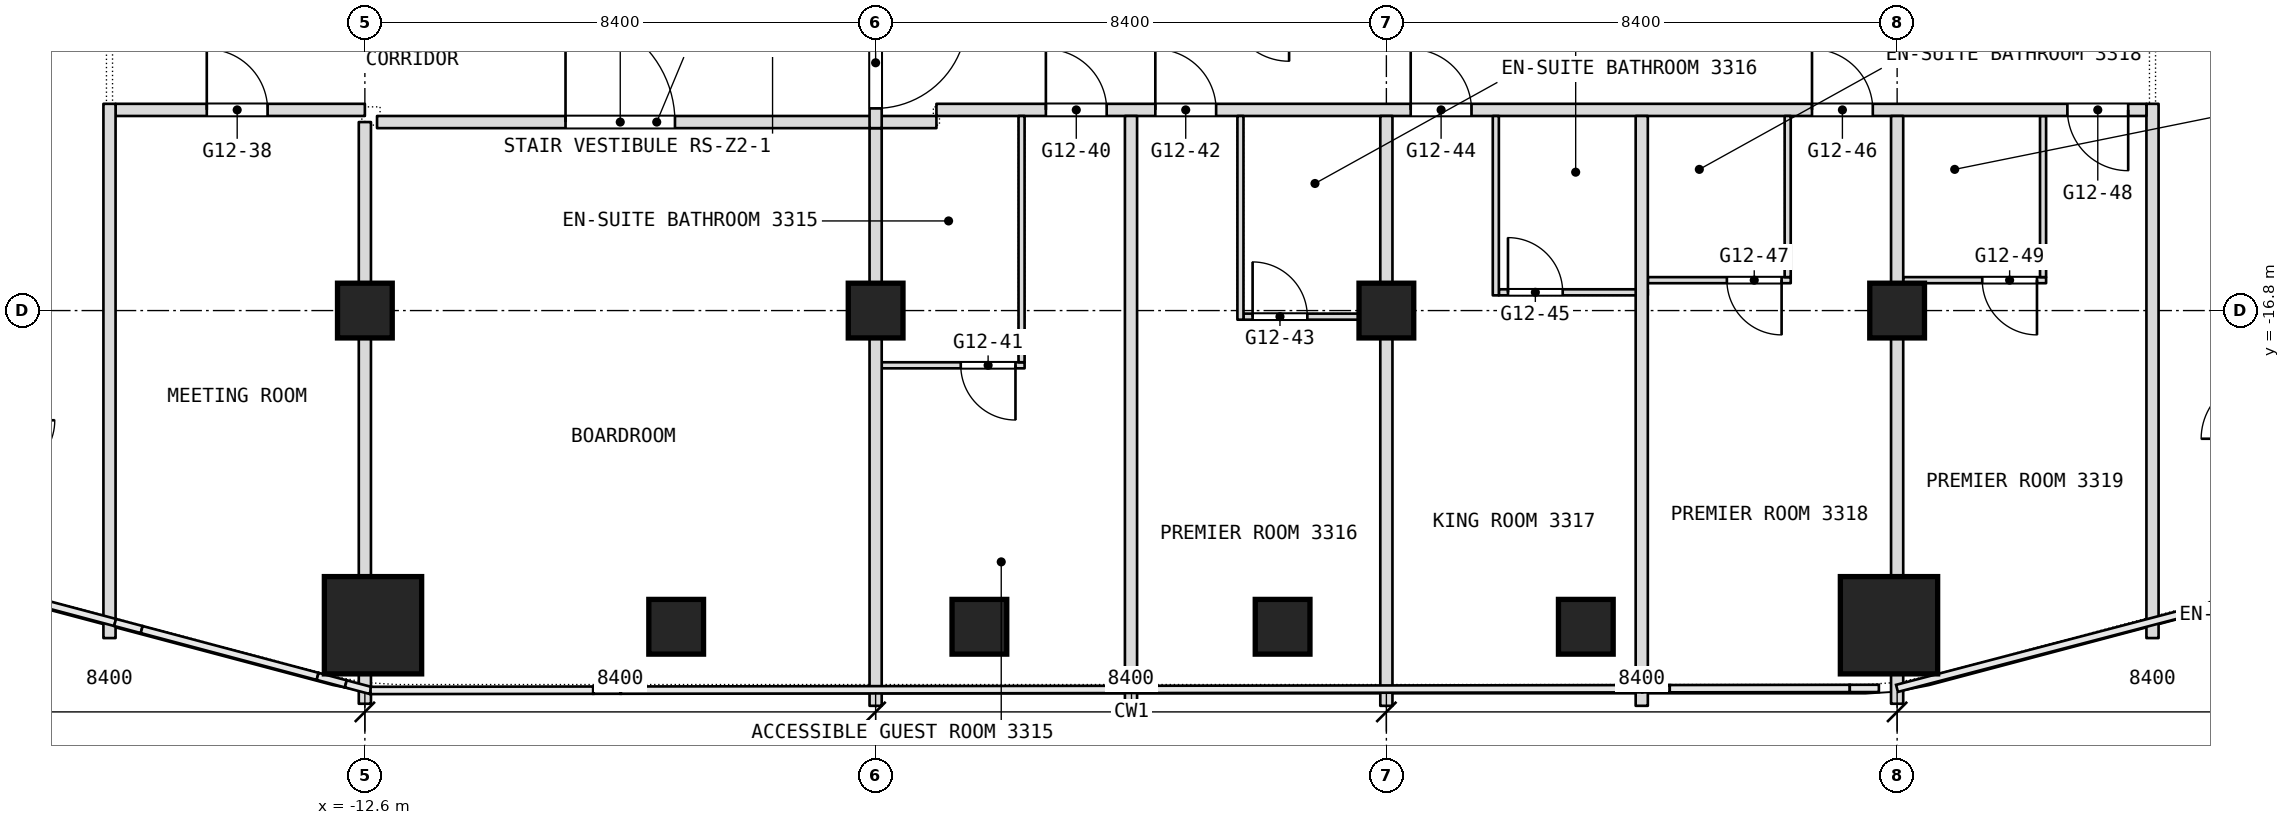
"""IFC4 building model, lengths in metres.
Left out: names, types, materials, properties, quantities, classifications, styles, units other than length and angle.
Written with IfcOpenShell. Run it as: python <this file> out.ifc"""

import sys

from ifc_helpers import new_model, si_unit, direction, frame, frame_2d, origin, origin_2d, place, context, subcontext, project, spatial, rectangle, extrude, element, fill, save


model = new_model("IFC4")
c1 = context("Model", 3, precision=1e-05, world=origin(), true_north=direction((0.0, 1.0)))
c2 = subcontext(c1, "Body", "Model", "MODEL_VIEW")
j1 = project(units=[si_unit("LENGTHUNIT", "METRE"), si_unit("PLANEANGLEUNIT", "RADIAN")], contexts=[c1])
p1 = place(None, origin())
s1 = spatial("IfcSite", under=j1, at=p1, CompositionType="ELEMENT")
p2 = place(p1, origin())
s2 = spatial("IfcBuilding", under=s1, at=p2, CompositionType="ELEMENT")
p3 = place(p2, frame((0.0, 0.0, 144.5)))
s3 = spatial("IfcBuildingStorey", under=s2, at=p3, CompositionType="ELEMENT", Elevation=144.5)
for number, where, z_axis, x_axis in (
    (1, (-12.466, -21.975, 0.0), (0.0, 0.0, 1.0), (1.0, 0.0, 0.0)),
    (2, (12.466, -21.975, 0.0), (0.0, 0.0, 1.0), (1.0, 0.0, 0.0)),
):
    element("IfcColumn", number, at=place(p3, frame(where, z_axis=z_axis, x_axis=x_axis)), inside=s3, PredefinedType="COLUMN", context=c2, shape_type="SweptSolid", body=[
        extrude(rectangle(XDim=1.6, YDim=1.6, at=origin_2d()), origin(), (0.0, 0.0, 1.0), 3.6),
    ])
for number, where, z_axis, x_axis in (
    (3, (-12.6, -16.8, 0.0), (0.0, 0.0, 1.0), (1.0, 0.0, 0.0)),
    (4, (-4.2, -16.8, 0.0), (0.0, 0.0, 1.0), (1.0, 0.0, 0.0)),
    (5, (4.2, -16.8, 0.0), (0.0, 0.0, 1.0), (1.0, 0.0, 0.0)),
    (6, (12.6, -16.8, 0.0), (0.0, 0.0, 1.0), (1.0, 0.0, 0.0)),
    (7, (7.48, -22.0, 0.0), (0.0, 0.0, 1.0), (1.0, 0.0, 0.0)),
    (8, (2.493, -22.0, 0.0), (0.0, 0.0, 1.0), (1.0, 0.0, 0.0)),
    (9, (-2.493, -22.0, 0.0), (0.0, 0.0, 1.0), (1.0, 0.0, 0.0)),
    (10, (-7.48, -22.0, 0.0), (0.0, 0.0, 1.0), (1.0, 0.0, 0.0)),
):
    element("IfcColumn", number, at=place(p3, frame(where, z_axis=z_axis, x_axis=x_axis)), inside=s3, PredefinedType="COLUMN", context=c2, shape_type="SweptSolid", body=[
        extrude(rectangle(XDim=0.9, YDim=0.9, at=origin_2d()), origin(), (0.0, 0.0, 1.0), 3.6),
    ])
p4 = place(p3, frame((-4.1, -17.7, 0.0), z_axis=(0.0, 0.0, 1.0), x_axis=(1.0, 0.0, 0.0)))
e11 = element("IfcWall", 11, at=p4, inside=s3, PredefinedType="PARTITIONING", context=c2, shape_type="SweptSolid", body=[
    extrude(rectangle(XDim=2.35, YDim=0.1, at=frame_2d((1.175, 0.0))), origin(), (0.0, 0.0, 1.0), 3.34),
])
p5 = place(p4, frame((1.3, 0.0, 0.0)))
e12 = element("IfcOpeningElement", 12, at=p5, cuts=e11, PredefinedType="OPENING", context=c2, shape_type="SweptSolid", body=[
    extrude(rectangle(XDim=0.9, YDim=2.1, at=frame_2d((0.45, 1.05))), frame((0.0, 0.05, 0.0), z_axis=(0.0, -1.0, 0.0), x_axis=(1.0, 0.0, 0.0)), (0.0, 0.0, 1.0), 0.1),
])
p6 = place(p3, frame((1.85, -16.9, 0.0), z_axis=(0.0, 0.0, 1.0), x_axis=(1.0, 0.0, 0.0)))
e13 = element("IfcWall", 13, at=p6, inside=s3, PredefinedType="PARTITIONING", context=c2, shape_type="SweptSolid", body=[
    extrude(rectangle(XDim=2.45, YDim=0.1, at=frame_2d((1.225, 0.0))), origin(), (0.0, 0.0, 1.0), 2.89),
])
p7 = place(p6, frame((0.15, 0.0, 0.0)))
e14 = element("IfcOpeningElement", 14, at=p7, cuts=e13, PredefinedType="OPENING", context=c2, shape_type="SweptSolid", body=[
    extrude(rectangle(XDim=0.9, YDim=2.1, at=frame_2d((0.45, 1.05))), frame((0.0, 0.05, 0.0), z_axis=(0.0, -1.0, 0.0), x_axis=(1.0, 0.0, 0.0)), (0.0, 0.0, 1.0), 0.1),
])
p8 = place(p3, frame((16.8, -22.186, 0.0), z_axis=(0.0, 0.0, 1.0), x_axis=(0.0, 1.0, 0.0)))
e15 = element("IfcWall", 15, at=p8, inside=s3, PredefinedType="PARTITIONING", context=c2, shape_type="SweptSolid", body=[
    extrude(rectangle(XDim=8.786, YDim=0.2, at=frame_2d((4.393, 0.0))), origin(), (0.0, 0.0, 1.0), 3.34),
])
p9 = place(p3, frame((6.05, -16.5, 0.0), z_axis=(0.0, 0.0, 1.0), x_axis=(1.0, 0.0, 0.0)))
e16 = element("IfcWall", 16, at=p9, inside=s3, PredefinedType="PARTITIONING", context=c2, shape_type="SweptSolid", body=[
    extrude(rectangle(XDim=2.45, YDim=0.1, at=frame_2d((1.225, 0.0))), origin(), (0.0, 0.0, 1.0), 3.34),
])
p10 = place(p9, frame((0.15, 0.0, 0.0)))
e17 = element("IfcOpeningElement", 17, at=p10, cuts=e16, PredefinedType="OPENING", context=c2, shape_type="SweptSolid", body=[
    extrude(rectangle(XDim=0.9, YDim=2.1, at=frame_2d((0.45, 1.05))), frame((0.0, 0.05, 0.0), z_axis=(0.0, -1.0, 0.0), x_axis=(1.0, 0.0, 0.0)), (0.0, 0.0, 1.0), 0.1),
])
p11 = place(p3, frame((8.5, -16.3, 0.0), z_axis=(0.0, 0.0, 1.0), x_axis=(1.0, 0.0, 0.0)))
e18 = element("IfcWall", 18, at=p11, inside=s3, PredefinedType="PARTITIONING", context=c2, shape_type="SweptSolid", body=[
    extrude(rectangle(XDim=2.35, YDim=0.1, at=frame_2d((1.175, 0.0))), origin(), (0.0, 0.0, 1.0), 3.34),
])
p12 = place(p11, frame((1.3, 0.0, 0.0)))
e19 = element("IfcOpeningElement", 19, at=p12, cuts=e18, PredefinedType="OPENING", context=c2, shape_type="SweptSolid", body=[
    extrude(rectangle(XDim=0.9, YDim=2.1, at=frame_2d((0.45, 1.05))), frame((0.0, 0.05, 0.0), z_axis=(0.0, -1.0, 0.0), x_axis=(1.0, 0.0, 0.0)), (0.0, 0.0, 1.0), 0.1),
])
p13 = place(p3, frame((12.7, -16.3, 0.0), z_axis=(0.0, 0.0, 1.0), x_axis=(1.0, 0.0, 0.0)))
e20 = element("IfcWall", 20, at=p13, inside=s3, PredefinedType="PARTITIONING", context=c2, shape_type="SweptSolid", body=[
    extrude(rectangle(XDim=2.35, YDim=0.1, at=frame_2d((1.175, 0.0))), origin(), (0.0, 0.0, 1.0), 3.34),
])
p14 = place(p13, frame((1.3, 0.0, 0.0)))
e21 = element("IfcOpeningElement", 21, at=p14, cuts=e20, PredefinedType="OPENING", context=c2, shape_type="SweptSolid", body=[
    extrude(rectangle(XDim=0.9, YDim=2.1, at=frame_2d((0.45, 1.05))), frame((0.0, 0.05, 0.0), z_axis=(0.0, -1.0, 0.0), x_axis=(1.0, 0.0, 0.0)), (0.0, 0.0, 1.0), 0.1),
])
p15 = place(p3, frame((15.0, -16.25, 0.0), z_axis=(0.0, 0.0, 1.0), x_axis=(0.0, 1.0, 0.0)))
e22 = element("IfcWall", 22, at=p15, inside=s3, PredefinedType="PARTITIONING", context=c2, shape_type="SweptSolid", body=[
    extrude(rectangle(XDim=2.65, YDim=0.1, at=frame_2d((1.325, 0.0))), origin(), (0.0, 0.0, 1.0), 3.34),
])
p16 = place(p3, frame((-12.4, -13.7, 0.0), z_axis=(0.0, 0.0, 1.0), x_axis=(1.0, 0.0, 0.0)))
e23 = element("IfcWall", 23, at=p16, inside=s3, PredefinedType="PARTITIONING", context=c2, shape_type="SweptSolid", body=[
    extrude(rectangle(XDim=9.2, YDim=0.2, at=frame_2d((4.6, 0.0))), origin(), (0.0, 0.0, 1.0), 3.34),
])
p17 = place(p16, frame((3.1, 0.0, 0.0)))
e24 = element("IfcOpeningElement", 24, at=p17, cuts=e23, PredefinedType="OPENING", context=c2, shape_type="SweptSolid", body=[
    extrude(rectangle(XDim=1.8, YDim=2.1, at=frame_2d((0.9, 1.05))), frame((0.0, 0.1, 0.0), z_axis=(0.0, -1.0, 0.0), x_axis=(1.0, 0.0, 0.0)), (0.0, 0.0, 1.0), 0.2),
])
p18 = place(p3, frame((-16.7, -13.5, 0.0), z_axis=(0.0, 0.0, 1.0), x_axis=(1.0, 0.0, 0.0)))
e25 = element("IfcWall", 25, at=p18, inside=s3, PredefinedType="PARTITIONING", context=c2, shape_type="SweptSolid", body=[
    extrude(rectangle(XDim=4.1, YDim=0.2, at=frame_2d((2.05, 0.0))), origin(), (0.0, 0.0, 1.0), 3.34),
])
p19 = place(p18, frame((1.5, 0.0, 0.0)))
e26 = element("IfcOpeningElement", 26, at=p19, cuts=e25, PredefinedType="OPENING", context=c2, shape_type="SweptSolid", body=[
    extrude(rectangle(XDim=1.0, YDim=2.1, at=frame_2d((0.5, 1.05))), frame((0.0, 0.1, 0.0), z_axis=(0.0, -1.0, 0.0), x_axis=(1.0, 0.0, 0.0)), (0.0, 0.0, 1.0), 0.2),
])
p20 = place(p3, frame((-3.2, -13.5, 0.0), z_axis=(0.0, 0.0, 1.0), x_axis=(1.0, 0.0, 0.0)))
e27 = element("IfcWall", 27, at=p20, inside=s3, PredefinedType="PARTITIONING", context=c2, shape_type="SweptSolid", body=[
    extrude(rectangle(XDim=19.9, YDim=0.2, at=frame_2d((9.95, 0.0))), origin(), (0.0, 0.0, 1.0), 3.34),
])
p21 = place(p20, frame((1.8, 0.0, 0.0)))
e28 = element("IfcOpeningElement", 28, at=p21, cuts=e27, PredefinedType="OPENING", context=c2, shape_type="SweptSolid", body=[
    extrude(rectangle(XDim=1.0, YDim=2.1, at=frame_2d((0.5, 1.05))), frame((0.0, 0.1, 0.0), z_axis=(0.0, -1.0, 0.0), x_axis=(1.0, 0.0, 0.0)), (0.0, 0.0, 1.0), 0.2),
])
p22 = place(p20, frame((3.6, 0.0, 0.0)))
e29 = element("IfcOpeningElement", 29, at=p22, cuts=e27, PredefinedType="OPENING", context=c2, shape_type="SweptSolid", body=[
    extrude(rectangle(XDim=1.0, YDim=2.1, at=frame_2d((0.5, 1.05))), frame((0.0, 0.1, 0.0), z_axis=(0.0, -1.0, 0.0), x_axis=(1.0, 0.0, 0.0)), (0.0, 0.0, 1.0), 0.2),
])
p23 = place(p20, frame((7.8, 0.0, 0.0)))
e30 = element("IfcOpeningElement", 30, at=p23, cuts=e27, PredefinedType="OPENING", context=c2, shape_type="SweptSolid", body=[
    extrude(rectangle(XDim=1.0, YDim=2.1, at=frame_2d((0.5, 1.05))), frame((0.0, 0.1, 0.0), z_axis=(0.0, -1.0, 0.0), x_axis=(1.0, 0.0, 0.0)), (0.0, 0.0, 1.0), 0.2),
])
p24 = place(p20, frame((14.4, 0.0, 0.0)))
e31 = element("IfcOpeningElement", 31, at=p24, cuts=e27, PredefinedType="OPENING", context=c2, shape_type="SweptSolid", body=[
    extrude(rectangle(XDim=1.0, YDim=2.1, at=frame_2d((0.5, 1.05))), frame((0.0, 0.1, 0.0), z_axis=(0.0, -1.0, 0.0), x_axis=(1.0, 0.0, 0.0)), (0.0, 0.0, 1.0), 0.2),
])
p25 = place(p20, frame((18.6, 0.0, 0.0)))
e32 = element("IfcOpeningElement", 32, at=p25, cuts=e27, PredefinedType="OPENING", context=c2, shape_type="SweptSolid", body=[
    extrude(rectangle(XDim=1.0, YDim=2.1, at=frame_2d((0.5, 1.05))), frame((0.0, 0.1, 0.0), z_axis=(0.0, -1.0, 0.0), x_axis=(1.0, 0.0, 0.0)), (0.0, 0.0, 1.0), 0.2),
])
p26 = place(p3, frame((12.6, -23.266, 0.0), z_axis=(0.0, 0.0, 1.0), x_axis=(0.0, 1.0, 0.0)))
e33 = element("IfcWall", 33, at=p26, inside=s3, PredefinedType="PARTITIONING", context=c2, shape_type="SweptSolid", body=[
    extrude(rectangle(XDim=0.491, YDim=0.2, at=frame_2d((0.246, 0.0))), origin(), (0.0, 0.0, 1.0), 3.34),
])
p27 = place(p3, frame((12.6, -21.175, 0.0), z_axis=(0.0, 0.0, 1.0), x_axis=(0.0, 1.0, 0.0)))
e34 = element("IfcWall", 34, at=p27, inside=s3, PredefinedType="PARTITIONING", context=c2, shape_type="SweptSolid", body=[
    extrude(rectangle(XDim=7.575, YDim=0.2, at=frame_2d((3.788, 0.0))), origin(), (0.0, 0.0, 1.0), 3.34),
])
p28 = place(p3, frame((10.8, -16.25, 0.0), z_axis=(0.0, 0.0, 1.0), x_axis=(0.0, 1.0, 0.0)))
e35 = element("IfcWall", 35, at=p28, inside=s3, PredefinedType="PARTITIONING", context=c2, shape_type="SweptSolid", body=[
    extrude(rectangle(XDim=2.65, YDim=0.1, at=frame_2d((1.325, 0.0))), origin(), (0.0, 0.0, 1.0), 3.34),
])
p29 = place(p3, frame((8.4, -23.3, 0.0), z_axis=(0.0, 0.0, 1.0), x_axis=(0.0, 1.0, 0.0)))
e36 = element("IfcWall", 36, at=p29, inside=s3, PredefinedType="PARTITIONING", context=c2, shape_type="SweptSolid", body=[
    extrude(rectangle(XDim=9.7, YDim=0.2, at=frame_2d((4.85, 0.0))), origin(), (0.0, 0.0, 1.0), 3.34),
])
p30 = place(p3, frame((6.0, -16.55, 0.0), z_axis=(0.0, 0.0, 1.0), x_axis=(0.0, 1.0, 0.0)))
e37 = element("IfcWall", 37, at=p30, inside=s3, PredefinedType="PARTITIONING", context=c2, shape_type="SweptSolid", body=[
    extrude(rectangle(XDim=2.95, YDim=0.1, at=frame_2d((1.475, 0.0))), origin(), (0.0, 0.0, 1.0), 3.34),
])
p31 = place(p3, frame((4.2, -23.3, 0.0), z_axis=(0.0, 0.0, 1.0), x_axis=(0.0, 1.0, 0.0)))
e38 = element("IfcWall", 38, at=p31, inside=s3, PredefinedType="PARTITIONING", context=c2, shape_type="SweptSolid", body=[
    extrude(rectangle(XDim=9.7, YDim=0.2, at=frame_2d((4.85, 0.0))), origin(), (0.0, 0.0, 1.0), 3.34),
])
p32 = place(p3, frame((1.8, -16.95, 0.0), z_axis=(0.0, 0.0, 1.0), x_axis=(0.0, 1.0, 0.0)))
e39 = element("IfcWall", 39, at=p32, inside=s3, PredefinedType="PARTITIONING", context=c2, shape_type="SweptSolid", body=[
    extrude(rectangle(XDim=3.35, YDim=0.1, at=frame_2d((1.675, 0.0))), origin(), (0.0, 0.0, 1.0), 3.34),
])
p33 = place(p3, frame((0.0, -23.3, 0.0), z_axis=(0.0, 0.0, 1.0), x_axis=(0.0, 1.0, 0.0)))
e40 = element("IfcWall", 40, at=p33, inside=s3, PredefinedType="PARTITIONING", context=c2, shape_type="SweptSolid", body=[
    extrude(rectangle(XDim=9.7, YDim=0.2, at=frame_2d((4.85, 0.0))), origin(), (0.0, 0.0, 1.0), 3.34),
])
p34 = place(p3, frame((-1.8, -17.65, 0.0), z_axis=(0.0, 0.0, 1.0), x_axis=(0.0, 1.0, 0.0)))
e41 = element("IfcWall", 41, at=p34, inside=s3, PredefinedType="PARTITIONING", context=c2, shape_type="SweptSolid", body=[
    extrude(rectangle(XDim=4.05, YDim=0.1, at=frame_2d((2.025, 0.0))), origin(), (0.0, 0.0, 1.0), 3.34),
])
p35 = place(p3, frame((-4.2, -23.3, 0.0), z_axis=(0.0, 0.0, 1.0), x_axis=(0.0, 1.0, 0.0)))
e42 = element("IfcWall", 42, at=p35, inside=s3, PredefinedType="PARTITIONING", context=c2, shape_type="SweptSolid", body=[
    extrude(rectangle(XDim=9.5, YDim=0.2, at=frame_2d((4.75, 0.0))), origin(), (0.0, 0.0, 1.0), 3.34),
])
p36 = place(p3, frame((-4.2, -13.8, 0.0), z_axis=(0.0, 0.0, 1.0), x_axis=(0.0, 1.0, 0.0)))
e43 = element("IfcWall", 43, at=p36, inside=s3, PredefinedType="PARTITIONING", context=c2, shape_type="SweptSolid", body=[
    extrude(rectangle(XDim=13.8, YDim=0.2, at=frame_2d((6.9, 0.0))), origin(), (0.0, 0.0, 1.0), 3.34),
])
p37 = place(p36, frame((12.15, 0.0, 0.0)))
e44 = element("IfcOpeningElement", 44, at=p37, cuts=e43, PredefinedType="OPENING", context=c2, shape_type="SweptSolid", body=[
    extrude(rectangle(XDim=1.5, YDim=2.1, at=frame_2d((0.75, 1.05))), frame((0.0, 0.1, 0.0), z_axis=(0.0, -1.0, 0.0), x_axis=(1.0, 0.0, 0.0)), (0.0, 0.0, 1.0), 0.2),
])
p38 = place(p36, frame((0.325, 0.0, 0.0)))
e45 = element("IfcOpeningElement", 45, at=p38, cuts=e43, PredefinedType="OPENING", context=c2, shape_type="SweptSolid", body=[
    extrude(rectangle(XDim=1.5, YDim=2.1, at=frame_2d((0.75, 1.05))), frame((0.0, 0.1, 0.0), z_axis=(0.0, -1.0, 0.0), x_axis=(1.0, 0.0, 0.0)), (0.0, 0.0, 1.0), 0.2),
])
p39 = place(p3, frame((-12.6, -23.266, 0.0), z_axis=(0.0, 0.0, 1.0), x_axis=(0.0, 1.0, 0.0)))
e46 = element("IfcWall", 46, at=p39, inside=s3, PredefinedType="PARTITIONING", context=c2, shape_type="SweptSolid", body=[
    extrude(rectangle(XDim=0.491, YDim=0.2, at=frame_2d((0.246, 0.0))), origin(), (0.0, 0.0, 1.0), 3.34),
])
p40 = place(p3, frame((-12.6, -21.175, 0.0), z_axis=(0.0, 0.0, 1.0), x_axis=(0.0, 1.0, 0.0)))
e47 = element("IfcWall", 47, at=p40, inside=s3, PredefinedType="PARTITIONING", context=c2, shape_type="SweptSolid", body=[
    extrude(rectangle(XDim=7.475, YDim=0.2, at=frame_2d((3.738, 0.0))), origin(), (0.0, 0.0, 1.0), 3.34),
])
p41 = place(p3, frame((-16.8, -22.186, 0.0), z_axis=(0.0, 0.0, 1.0), x_axis=(0.0, 1.0, 0.0)))
e48 = element("IfcWall", 48, at=p41, inside=s3, PredefinedType="PARTITIONING", context=c2, shape_type="SweptSolid", body=[
    extrude(rectangle(XDim=8.786, YDim=0.2, at=frame_2d((4.393, 0.0))), origin(), (0.0, 0.0, 1.0), 3.34),
])
p42 = place(p5, origin())
e49 = element("IfcDoor", 49, at=p42, inside=s3, OperationType="SINGLE_SWING_RIGHT", PredefinedType="DOOR", context=c2, shape_type="SweptSolid", body=[
    extrude(rectangle(XDim=0.9, YDim=2.1, at=frame_2d((0.45, 1.05))), frame((0.0, 0.025, 0.0), z_axis=(0.0, -1.0, 0.0), x_axis=(1.0, 0.0, 0.0)), (0.0, 0.0, 1.0), 0.05),
])
fill(e12, e49)
p43 = place(p7, origin())
e50 = element("IfcDoor", 50, at=p43, inside=s3, OperationType="SINGLE_SWING_LEFT", PredefinedType="DOOR", context=c2, shape_type="SweptSolid", body=[
    extrude(rectangle(XDim=0.9, YDim=2.1, at=frame_2d((0.45, 1.05))), frame((0.0, 0.025, 0.0), z_axis=(0.0, -1.0, 0.0), x_axis=(1.0, 0.0, 0.0)), (0.0, 0.0, 1.0), 0.05),
])
fill(e14, e50)
p44 = place(p10, origin())
e51 = element("IfcDoor", 51, at=p44, inside=s3, OperationType="SINGLE_SWING_LEFT", PredefinedType="DOOR", context=c2, shape_type="SweptSolid", body=[
    extrude(rectangle(XDim=0.9, YDim=2.1, at=frame_2d((0.45, 1.05))), frame((0.0, 0.025, 0.0), z_axis=(0.0, -1.0, 0.0), x_axis=(1.0, 0.0, 0.0)), (0.0, 0.0, 1.0), 0.05),
])
fill(e17, e51)
p45 = place(p12, origin())
e52 = element("IfcDoor", 52, at=p45, inside=s3, OperationType="SINGLE_SWING_RIGHT", PredefinedType="DOOR", context=c2, shape_type="SweptSolid", body=[
    extrude(rectangle(XDim=0.9, YDim=2.1, at=frame_2d((0.45, 1.05))), frame((0.0, 0.025, 0.0), z_axis=(0.0, -1.0, 0.0), x_axis=(1.0, 0.0, 0.0)), (0.0, 0.0, 1.0), 0.05),
])
fill(e19, e52)
p46 = place(p14, origin())
e53 = element("IfcDoor", 53, at=p46, inside=s3, OperationType="SINGLE_SWING_RIGHT", PredefinedType="DOOR", context=c2, shape_type="SweptSolid", body=[
    extrude(rectangle(XDim=0.9, YDim=2.1, at=frame_2d((0.45, 1.05))), frame((0.0, 0.025, 0.0), z_axis=(0.0, -1.0, 0.0), x_axis=(1.0, 0.0, 0.0)), (0.0, 0.0, 1.0), 0.05),
])
fill(e21, e53)
p47 = place(p17, origin())
e54 = element("IfcDoor", 54, at=p47, inside=s3, OperationType="DOUBLE_DOOR_SINGLE_SWING", PredefinedType="DOOR", context=c2, shape_type="SweptSolid", body=[
    extrude(rectangle(XDim=1.8, YDim=2.1, at=frame_2d((0.9, 1.05))), frame((0.0, 0.025, 0.0), z_axis=(0.0, -1.0, 0.0), x_axis=(1.0, 0.0, 0.0)), (0.0, 0.0, 1.0), 0.05),
])
fill(e24, e54)
p48 = place(p19, origin())
e55 = element("IfcDoor", 55, at=p48, inside=s3, OperationType="SINGLE_SWING_LEFT", PredefinedType="DOOR", context=c2, shape_type="SweptSolid", body=[
    extrude(rectangle(XDim=1.0, YDim=2.1, at=frame_2d((0.5, 1.05))), frame((0.0, 0.025, 0.0), z_axis=(0.0, -1.0, 0.0), x_axis=(1.0, 0.0, 0.0)), (0.0, 0.0, 1.0), 0.05),
])
fill(e26, e55)
p49 = place(p21, origin())
e56 = element("IfcDoor", 56, at=p49, inside=s3, OperationType="SINGLE_SWING_RIGHT", PredefinedType="DOOR", context=c2, shape_type="SweptSolid", body=[
    extrude(rectangle(XDim=1.0, YDim=2.1, at=frame_2d((0.5, 1.05))), frame((0.0, 0.025, 0.0), z_axis=(0.0, -1.0, 0.0), x_axis=(1.0, 0.0, 0.0)), (0.0, 0.0, 1.0), 0.05),
])
fill(e28, e56)
p50 = place(p22, origin())
e57 = element("IfcDoor", 57, at=p50, inside=s3, OperationType="SINGLE_SWING_RIGHT", PredefinedType="DOOR", context=c2, shape_type="SweptSolid", body=[
    extrude(rectangle(XDim=1.0, YDim=2.1, at=frame_2d((0.5, 1.05))), frame((0.0, 0.025, 0.0), z_axis=(0.0, -1.0, 0.0), x_axis=(1.0, 0.0, 0.0)), (0.0, 0.0, 1.0), 0.05),
])
fill(e29, e57)
p51 = place(p23, origin())
e58 = element("IfcDoor", 58, at=p51, inside=s3, OperationType="SINGLE_SWING_RIGHT", PredefinedType="DOOR", context=c2, shape_type="SweptSolid", body=[
    extrude(rectangle(XDim=1.0, YDim=2.1, at=frame_2d((0.5, 1.05))), frame((0.0, 0.025, 0.0), z_axis=(0.0, -1.0, 0.0), x_axis=(1.0, 0.0, 0.0)), (0.0, 0.0, 1.0), 0.05),
])
fill(e30, e58)
p52 = place(p24, origin())
e59 = element("IfcDoor", 59, at=p52, inside=s3, OperationType="SINGLE_SWING_RIGHT", PredefinedType="DOOR", context=c2, shape_type="SweptSolid", body=[
    extrude(rectangle(XDim=1.0, YDim=2.1, at=frame_2d((0.5, 1.05))), frame((0.0, 0.025, 0.0), z_axis=(0.0, -1.0, 0.0), x_axis=(1.0, 0.0, 0.0)), (0.0, 0.0, 1.0), 0.05),
])
fill(e31, e59)
p53 = place(p25, origin())
e60 = element("IfcDoor", 60, at=p53, inside=s3, OperationType="SINGLE_SWING_LEFT", PredefinedType="DOOR", context=c2, shape_type="SweptSolid", body=[
    extrude(rectangle(XDim=1.0, YDim=2.1, at=frame_2d((0.5, 1.05))), frame((0.0, 0.025, 0.0), z_axis=(0.0, -1.0, 0.0), x_axis=(1.0, 0.0, 0.0)), (0.0, 0.0, 1.0), 0.05),
])
fill(e32, e60)
p54 = place(p38, origin())
e61 = element("IfcDoor", 61, at=p54, inside=s3, OperationType="DOUBLE_DOOR_DOUBLE_SWING", PredefinedType="DOOR", context=c2, shape_type="SweptSolid", body=[
    extrude(rectangle(XDim=1.5, YDim=2.1, at=frame_2d((0.75, 1.05))), frame((0.0, 0.025, 0.0), z_axis=(0.0, -1.0, 0.0), x_axis=(1.0, 0.0, 0.0)), (0.0, 0.0, 1.0), 0.05),
])
fill(e45, e61)
save(model, sys.argv[1])
